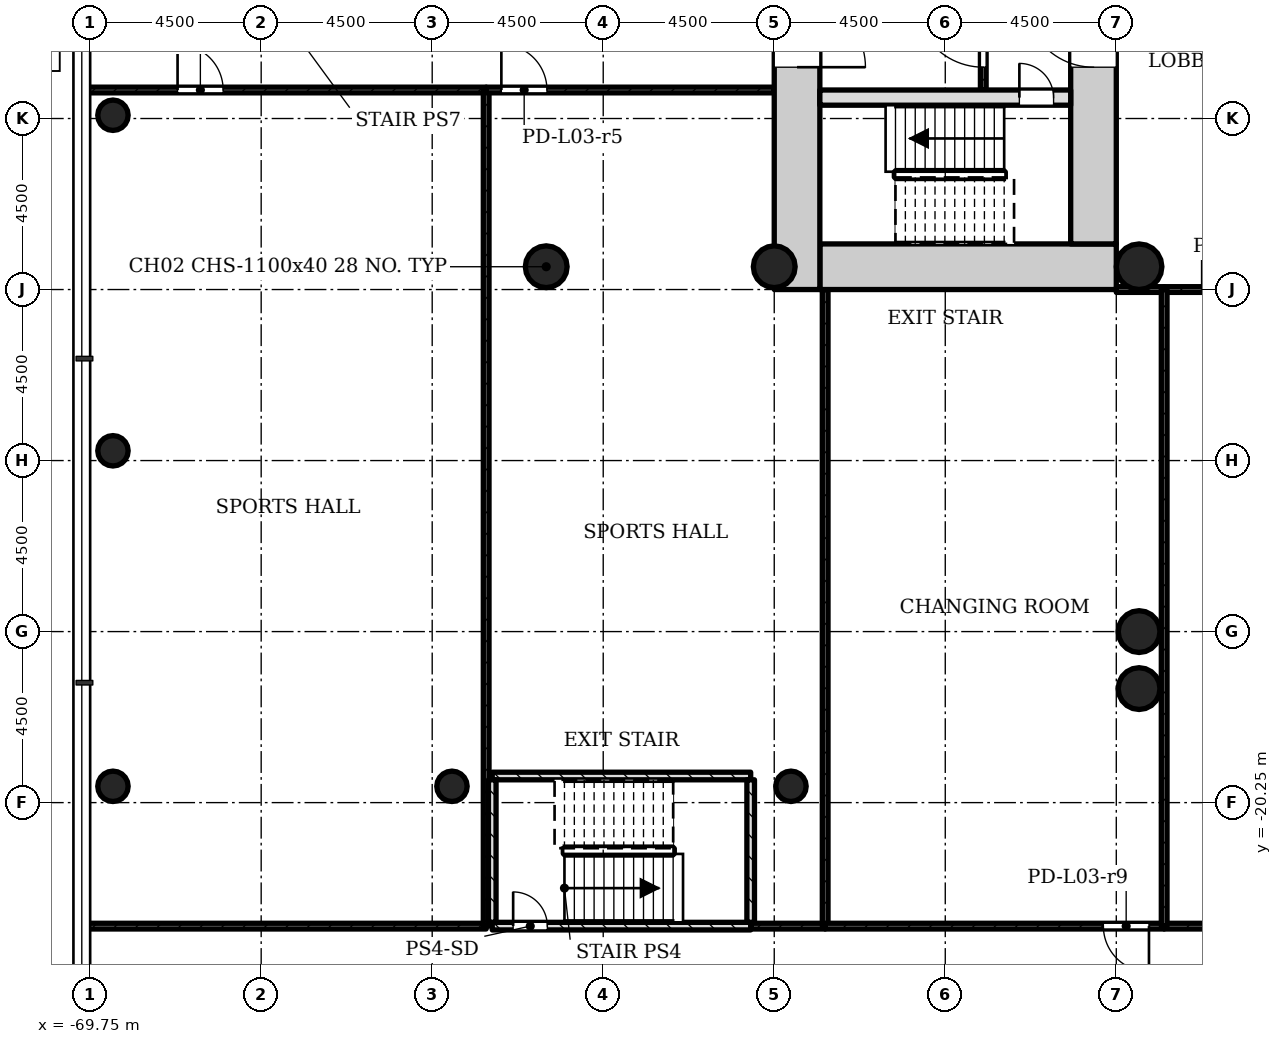
"""IFC4 building model, lengths in metres.
Left out: names, types, materials, properties, quantities, classifications, styles, units other than length and angle.
Written with IfcOpenShell. Run it as: python <this file> out.ifc"""

import sys

from ifc_helpers import new_model, si_unit, direction, frame, frame_2d, origin, origin_2d, place, context, subcontext, project, spatial, rectangle, hollow_circle, extrude, element, fill, save


model = new_model("IFC4")
c1 = context("Model", 3, precision=1e-05, world=origin(), true_north=direction((0.0, 1.0)))
c2 = subcontext(c1, "Body", "Model", "MODEL_VIEW")
j1 = project(units=[si_unit("LENGTHUNIT", "METRE"), si_unit("PLANEANGLEUNIT", "RADIAN")], contexts=[c1])
p1 = place(None, origin())
s1 = spatial("IfcSite", under=j1, at=p1, CompositionType="ELEMENT")
p2 = place(p1, origin())
s2 = spatial("IfcBuilding", under=s1, at=p2, CompositionType="ELEMENT")
p3 = place(p2, frame((0.0, 0.0, 15.5)))
s3 = spatial("IfcBuildingStorey", under=s2, at=p3, CompositionType="ELEMENT", Elevation=15.5)
p4 = place(p3, frame((-50.55, -6.15, 0.0), z_axis=(0.0, 0.0, 1.0), x_axis=(1.0, 0.0, 0.0)))
e1 = element("IfcWall", 1, at=p4, inside=s3, PredefinedType="SHEAR", context=c2, shape_type="SweptSolid", body=[
    extrude(rectangle(XDim=7.8, YDim=1.2, at=frame_2d((3.9, 0.0))), origin(), (0.0, 0.0, 1.0), 4.5),
])
p5 = place(p3, frame((-43.35, -5.55, 0.0), z_axis=(0.0, 0.0, 1.0), x_axis=(0.0, 1.0, 0.0)))
e2 = element("IfcWall", 2, at=p5, inside=s3, PredefinedType="SHEAR", context=c2, shape_type="SweptSolid", body=[
    extrude(rectangle(XDim=12.3, YDim=1.2, at=frame_2d((6.15, 0.0))), origin(), (0.0, 0.0, 1.0), 4.5),
])
p6 = place(p5, frame((4.65, 0.0, 0.0)))
e3 = element("IfcOpeningElement", 3, at=p6, cuts=e2, PredefinedType="OPENING", context=c2, shape_type="SweptSolid", body=[
    extrude(rectangle(XDim=1.8, YDim=2.1, at=frame_2d((0.9, 1.05))), frame((0.0, 0.61, 0.0), z_axis=(0.0, -1.0, 0.0), x_axis=(1.0, 0.0, 0.0)), (0.0, 0.0, 1.0), 1.22),
])
p7 = place(p3, frame((-51.15, 5.55, 0.0), z_axis=(0.0, 0.0, 1.0), x_axis=(0.0, -1.0, 0.0)))
e4 = element("IfcWall", 4, at=p7, inside=s3, PredefinedType="SHEAR", context=c2, shape_type="SweptSolid", body=[
    extrude(rectangle(XDim=12.3, YDim=1.2, at=frame_2d((6.15, 0.0))), origin(), (0.0, 0.0, 1.0), 4.5),
])
p8 = place(p7, frame((4.65, 0.0, 0.0)))
e5 = element("IfcOpeningElement", 5, at=p8, cuts=e4, PredefinedType="OPENING", context=c2, shape_type="SweptSolid", body=[
    extrude(rectangle(XDim=1.8, YDim=2.1, at=frame_2d((0.9, 1.05))), frame((0.0, 0.61, 0.0), z_axis=(0.0, -1.0, 0.0), x_axis=(1.0, 0.0, 0.0)), (0.0, 0.0, 1.0), 1.22),
])
p9 = place(p3, frame((-50.55, -1.7, 0.0), z_axis=(0.0, 0.0, 1.0), x_axis=(1.0, 0.0, 0.0)))
e6 = element("IfcWall", 6, at=p9, inside=s3, PredefinedType="SHEAR", context=c2, shape_type="SweptSolid", body=[
    extrude(rectangle(XDim=6.6, YDim=0.4, at=frame_2d((3.3, 0.0))), origin(), (0.0, 0.0, 1.0), 4.5),
])
p10 = place(p9, frame((5.25, 0.0, 0.0)))
e7 = element("IfcOpeningElement", 7, at=p10, cuts=e6, PredefinedType="OPENING", context=c2, shape_type="SweptSolid", body=[
    extrude(rectangle(XDim=0.9, YDim=2.1, at=frame_2d((0.45, 1.05))), frame((0.0, 0.21, 0.0), z_axis=(0.0, -1.0, 0.0), x_axis=(1.0, 0.0, 0.0)), (0.0, 0.0, 1.0), 0.42),
])
for number, where, z_axis, x_axis in (
    (8, (-51.75, -6.15, 0.0), (0.0, 0.0, 1.0), (1.0, 0.0, 0.0)),
    (9, (-57.75, -6.15, 0.0), (0.0, 0.0, 1.0), (1.0, 0.0, 0.0)),
    (10, (-42.15, -15.75, 0.0), (0.0, 0.0, 1.0), (1.0, 0.0, 0.0)),
    (11, (-42.15, -17.25, 0.0), (0.0, 0.0, 1.0), (1.0, 0.0, 0.0)),
):
    element("IfcColumn", number, at=place(p3, frame(where, z_axis=z_axis, x_axis=x_axis)), inside=s3, PredefinedType="COLUMN", context=c2, shape_type="SweptSolid", body=[
        extrude(hollow_circle(Radius=0.55, WallThickness=0.04, at=origin_2d()), origin(), (0.0, 0.0, 1.0), 4.5),
    ])
p11 = place(p3, frame((-42.15, -6.15, 0.0), z_axis=(0.0, 0.0, 1.0), x_axis=(1.0, 0.0, 0.0)))
e12 = element("IfcColumn", 12, at=p11, inside=s3, PredefinedType="COLUMN", context=c2, shape_type="SweptSolid", body=[
    extrude(hollow_circle(Radius=0.6, WallThickness=0.045, at=origin_2d()), origin(), (0.0, 0.0, 1.0), 4.5),
])
for number, where, z_axis, x_axis in (
    (13, (-69.15, -19.821, 0.0), (0.0, 0.0, 1.0), (1.0, 0.0, 0.0)),
    (14, (-60.23, -19.821, 0.0), (0.0, 0.0, 1.0), (1.0, 0.0, 0.0)),
    (15, (-51.31, -19.821, 0.0), (0.0, 0.0, 1.0), (1.0, 0.0, 0.0)),
    (16, (-69.15, -10.993, 0.0), (0.0, 0.0, 1.0), (1.0, 0.0, 0.0)),
    (17, (-69.15, -2.164, 0.0), (0.0, 0.0, 1.0), (1.0, 0.0, 0.0)),
):
    element("IfcColumn", number, at=place(p3, frame(where, z_axis=z_axis, x_axis=x_axis)), inside=s3, PredefinedType="COLUMN", context=c2, shape_type="SweptSolid", body=[
        extrude(hollow_circle(Radius=0.4, WallThickness=0.028, at=origin_2d()), origin(), (0.0, 0.0, 1.0), 4.5),
    ])
p12 = place(p3, frame((-46.25, 1.5, 0.0), z_axis=(0.0, 0.0, 1.0), x_axis=(0.0, -1.0, 0.0)))
e18 = element("IfcWall", 18, at=p12, inside=s3, PredefinedType="PARTITIONING", context=c2, shape_type="SweptSolid", body=[
    extrude(rectangle(XDim=3.0, YDim=0.15, at=frame_2d((1.5, 0.0))), origin(), (0.0, 0.0, 1.0), 4.08),
])
p13 = place(p12, frame((0.6, 0.0, 0.0)))
e19 = element("IfcOpeningElement", 19, at=p13, cuts=e18, PredefinedType="OPENING", context=c2, shape_type="SweptSolid", body=[
    extrude(rectangle(XDim=1.8, YDim=2.1, at=frame_2d((0.9, 1.05))), frame((0.0, 0.085, 0.0), z_axis=(0.0, -1.0, 0.0), x_axis=(1.0, 0.0, 0.0)), (0.0, 0.0, 1.0), 0.17),
])
p14 = place(p3, frame((-69.85, -1.5, 0.0), z_axis=(0.0, 0.0, 1.0), x_axis=(1.0, 0.0, 0.0)))
e20 = element("IfcWall", 20, at=p14, inside=s3, PredefinedType="PARTITIONING", context=c2, shape_type="SweptSolid", body=[
    extrude(rectangle(XDim=10.52, YDim=0.15, at=frame_2d((5.26, 0.0))), origin(), (0.0, 0.0, 1.0), 4.08),
])
p15 = place(p14, frame((2.4, 0.0, 0.0)))
e21 = element("IfcOpeningElement", 21, at=p15, cuts=e20, PredefinedType="OPENING", context=c2, shape_type="SweptSolid", body=[
    extrude(rectangle(XDim=1.2, YDim=2.1, at=frame_2d((0.6, 1.05))), frame((0.0, 0.085, 0.0), z_axis=(0.0, -1.0, 0.0), x_axis=(1.0, 0.0, 0.0)), (0.0, 0.0, 1.0), 0.17),
])
p16 = place(p3, frame((-59.33, -23.5, 0.0), z_axis=(0.0, 0.0, 1.0), x_axis=(-1.0, 0.0, 0.0)))
e22 = element("IfcWall", 22, at=p16, inside=s3, PredefinedType="PARTITIONING", context=c2, shape_type="SweptSolid", body=[
    extrude(rectangle(XDim=10.52, YDim=0.15, at=frame_2d((5.26, 0.0))), origin(), (0.0, 0.0, 1.0), 4.08),
])
p17 = place(p3, frame((-59.33, -1.5, 0.0), z_axis=(0.0, 0.0, 1.0), x_axis=(0.0, -1.0, 0.0)))
e23 = element("IfcWall", 23, at=p17, inside=s3, PredefinedType="PARTITIONING", context=c2, shape_type="SweptSolid", body=[
    extrude(rectangle(XDim=22.0, YDim=0.15, at=frame_2d((11.0, 0.0))), origin(), (0.0, 0.0, 1.0), 4.08),
])
p18 = place(p3, frame((-59.33, -1.5, 0.0), z_axis=(0.0, 0.0, 1.0), x_axis=(1.0, 0.0, 0.0)))
e24 = element("IfcWall", 24, at=p18, inside=s3, PredefinedType="PARTITIONING", context=c2, shape_type="SweptSolid", body=[
    extrude(rectangle(XDim=7.58, YDim=0.15, at=frame_2d((3.79, 0.0))), origin(), (0.0, 0.0, 1.0), 4.08),
])
p19 = place(p18, frame((0.4, 0.0, 0.0)))
e25 = element("IfcOpeningElement", 25, at=p19, cuts=e24, PredefinedType="OPENING", context=c2, shape_type="SweptSolid", body=[
    extrude(rectangle(XDim=1.2, YDim=2.1, at=frame_2d((0.6, 1.05))), frame((0.0, 0.085, 0.0), z_axis=(0.0, -1.0, 0.0), x_axis=(1.0, 0.0, 0.0)), (0.0, 0.0, 1.0), 0.17),
])
p20 = place(p3, frame((-50.41, -23.5, 0.0), z_axis=(0.0, 0.0, 1.0), x_axis=(-1.0, 0.0, 0.0)))
e26 = element("IfcWall", 26, at=p20, inside=s3, PredefinedType="PARTITIONING", context=c2, shape_type="SweptSolid", body=[
    extrude(rectangle(XDim=1.96, YDim=0.15, at=frame_2d((0.98, 0.0))), origin(), (0.0, 0.0, 1.0), 4.08),
])
p21 = place(p3, frame((-50.41, -6.75, 0.0), z_axis=(0.0, 0.0, 1.0), x_axis=(0.0, -1.0, 0.0)))
e27 = element("IfcWall", 27, at=p21, inside=s3, PredefinedType="PARTITIONING", context=c2, shape_type="SweptSolid", body=[
    extrude(rectangle(XDim=16.75, YDim=0.15, at=frame_2d((8.375, 0.0))), origin(), (0.0, 0.0, 1.0), 4.08),
])
p22 = place(p3, frame((-42.75, -6.75, 0.0), z_axis=(0.0, 0.0, 1.0), x_axis=(1.0, 0.0, 0.0)))
e28 = element("IfcWall", 28, at=p22, inside=s3, PredefinedType="PARTITIONING", context=c2, shape_type="SweptSolid", body=[
    extrude(rectangle(XDim=1.26, YDim=0.15, at=frame_2d((0.63, 0.0))), origin(), (0.0, 0.0, 1.0), 4.08),
])
p23 = place(p3, frame((-41.49, -23.5, 0.0), z_axis=(0.0, 0.0, 1.0), x_axis=(-1.0, 0.0, 0.0)))
e29 = element("IfcWall", 29, at=p23, inside=s3, PredefinedType="PARTITIONING", context=c2, shape_type="SweptSolid", body=[
    extrude(rectangle(XDim=8.92, YDim=0.15, at=frame_2d((4.46, 0.0))), origin(), (0.0, 0.0, 1.0), 4.08),
])
p24 = place(p23, frame((0.4, 0.0, 0.0)))
e30 = element("IfcOpeningElement", 30, at=p24, cuts=e29, PredefinedType="OPENING", context=c2, shape_type="SweptSolid", body=[
    extrude(rectangle(XDim=1.2, YDim=2.1, at=frame_2d((0.6, 1.05))), frame((0.0, 0.085, 0.0), z_axis=(0.0, -1.0, 0.0), x_axis=(1.0, 0.0, 0.0)), (0.0, 0.0, 1.0), 0.17),
])
p25 = place(p3, frame((-41.49, -6.75, 0.0), z_axis=(0.0, 0.0, 1.0), x_axis=(1.0, 0.0, 0.0)))
e31 = element("IfcWall", 31, at=p25, inside=s3, PredefinedType="PARTITIONING", context=c2, shape_type="SweptSolid", body=[
    extrude(rectangle(XDim=8.92, YDim=0.15, at=frame_2d((4.46, 0.0))), origin(), (0.0, 0.0, 1.0), 4.08),
])
p26 = place(p25, frame((1.0, 0.0, 0.0)))
e32 = element("IfcOpeningElement", 32, at=p26, cuts=e31, PredefinedType="OPENING", context=c2, shape_type="SweptSolid", body=[
    extrude(rectangle(XDim=1.2, YDim=2.1, at=frame_2d((0.6, 1.05))), frame((0.0, 0.085, 0.0), z_axis=(0.0, -1.0, 0.0), x_axis=(1.0, 0.0, 0.0)), (0.0, 0.0, 1.0), 0.17),
])
p27 = place(p3, frame((-32.57, -23.5, 0.0), z_axis=(0.0, 0.0, 1.0), x_axis=(-1.0, 0.0, 0.0)))
e33 = element("IfcWall", 33, at=p27, inside=s3, PredefinedType="PARTITIONING", context=c2, shape_type="SweptSolid", body=[
    extrude(rectangle(XDim=8.92, YDim=0.15, at=frame_2d((4.46, 0.0))), origin(), (0.0, 0.0, 1.0), 4.08),
])
p28 = place(p3, frame((-41.49, -23.5, 0.0), z_axis=(0.0, 0.0, 1.0), x_axis=(0.0, 1.0, 0.0)))
e34 = element("IfcWall", 34, at=p28, inside=s3, PredefinedType="PARTITIONING", context=c2, shape_type="SweptSolid", body=[
    extrude(rectangle(XDim=16.75, YDim=0.15, at=frame_2d((8.375, 0.0))), origin(), (0.0, 0.0, 1.0), 4.08),
])
p29 = place(p3, frame((-59.17, -23.5, 0.0), z_axis=(0.0, 0.0, 1.0), x_axis=(1.0, 0.0, 0.0)))
e35 = element("IfcWall", 35, at=p29, inside=s3, PredefinedType="SHEAR", context=c2, shape_type="SweptSolid", body=[
    extrude(rectangle(XDim=6.8, YDim=0.2, at=frame_2d((3.4, 0.0))), origin(), (0.0, 0.0, 1.0), 4.08),
])
p30 = place(p29, frame((0.55, 0.0, 0.0)))
e36 = element("IfcOpeningElement", 36, at=p30, cuts=e35, PredefinedType="OPENING", context=c2, shape_type="SweptSolid", body=[
    extrude(rectangle(XDim=0.9, YDim=2.1, at=frame_2d((0.45, 1.05))), frame((0.0, 0.11, 0.0), z_axis=(0.0, -1.0, 0.0), x_axis=(1.0, 0.0, 0.0)), (0.0, 0.0, 1.0), 0.22),
])
p31 = place(p3, frame((-59.17, -19.55, 0.0), z_axis=(0.0, 0.0, 1.0), x_axis=(1.0, 0.0, 0.0)))
e37 = element("IfcWall", 37, at=p31, inside=s3, PredefinedType="SHEAR", context=c2, shape_type="SweptSolid", body=[
    extrude(rectangle(XDim=6.8, YDim=0.2, at=frame_2d((3.4, 0.0))), origin(), (0.0, 0.0, 1.0), 4.08),
])
for number, where, z_axis, x_axis in (
    (38, (-59.17, -23.4, 0.0), (0.0, 0.0, 1.0), (0.0, 1.0, 0.0)),
    (39, (-52.37, -23.4, 0.0), (0.0, 0.0, 1.0), (0.0, 1.0, 0.0)),
):
    element("IfcWall", number, at=place(p3, frame(where, z_axis=z_axis, x_axis=x_axis)), inside=s3, PredefinedType="SHEAR", context=c2, shape_type="SweptSolid", body=[
        extrude(rectangle(XDim=3.75, YDim=0.2, at=frame_2d((1.875, 0.0))), origin(), (0.0, 0.0, 1.0), 4.08),
    ])
p32 = place(p13, origin())
e40 = element("IfcDoor", 40, at=p32, inside=s3, OperationType="SINGLE_SWING_LEFT", PredefinedType="DOOR", context=c2, shape_type="SweptSolid", body=[
    extrude(rectangle(XDim=1.8, YDim=2.1, at=frame_2d((0.9, 1.05))), frame((0.0, 0.025, 0.0), z_axis=(0.0, -1.0, 0.0), x_axis=(1.0, 0.0, 0.0)), (0.0, 0.0, 1.0), 0.05),
])
fill(e19, e40)
p33 = place(p15, origin())
e41 = element("IfcDoor", 41, at=p33, inside=s3, OperationType="SINGLE_SWING_RIGHT", PredefinedType="DOOR", context=c2, shape_type="SweptSolid", body=[
    extrude(rectangle(XDim=1.2, YDim=2.1, at=frame_2d((0.6, 1.05))), frame((0.0, 0.025, 0.0), z_axis=(0.0, -1.0, 0.0), x_axis=(1.0, 0.0, 0.0)), (0.0, 0.0, 1.0), 0.05),
])
fill(e21, e41)
p34 = place(p19, origin())
e42 = element("IfcDoor", 42, at=p34, inside=s3, OperationType="SINGLE_SWING_RIGHT", PredefinedType="DOOR", context=c2, shape_type="SweptSolid", body=[
    extrude(rectangle(XDim=1.2, YDim=2.1, at=frame_2d((0.6, 1.05))), frame((0.0, 0.025, 0.0), z_axis=(0.0, -1.0, 0.0), x_axis=(1.0, 0.0, 0.0)), (0.0, 0.0, 1.0), 0.05),
])
fill(e25, e42)
p35 = place(p24, origin())
e43 = element("IfcDoor", 43, at=p35, inside=s3, OperationType="SINGLE_SWING_RIGHT", PredefinedType="DOOR", context=c2, shape_type="SweptSolid", body=[
    extrude(rectangle(XDim=1.2, YDim=2.1, at=frame_2d((0.6, 1.05))), frame((0.0, 0.025, 0.0), z_axis=(0.0, -1.0, 0.0), x_axis=(1.0, 0.0, 0.0)), (0.0, 0.0, 1.0), 0.05),
])
fill(e30, e43)
p36 = place(p30, origin())
e44 = element("IfcDoor", 44, at=p36, inside=s3, OperationType="SINGLE_SWING_RIGHT", PredefinedType="DOOR", context=c2, shape_type="SweptSolid", body=[
    extrude(rectangle(XDim=0.9, YDim=2.1, at=frame_2d((0.45, 1.05))), frame((0.0, 0.025, 0.0), z_axis=(0.0, -1.0, 0.0), x_axis=(1.0, 0.0, 0.0)), (0.0, 0.0, 1.0), 0.05),
])
fill(e36, e44)
p37 = place(p10, origin())
e45 = element("IfcDoor", 45, at=p37, inside=s3, OperationType="SINGLE_SWING_RIGHT", PredefinedType="DOOR", context=c2, shape_type="SweptSolid", body=[
    extrude(rectangle(XDim=0.9, YDim=2.1, at=frame_2d((0.45, 1.05))), frame((0.0, 0.025, 0.0), z_axis=(0.0, -1.0, 0.0), x_axis=(1.0, 0.0, 0.0)), (0.0, 0.0, 1.0), 0.05),
])
fill(e7, e45)
p38 = place(p6, origin())
e46 = element("IfcDoor", 46, at=p38, inside=s3, OperationType="SINGLE_SWING_LEFT", PredefinedType="DOOR", context=c2, shape_type="SweptSolid", body=[
    extrude(rectangle(XDim=1.8, YDim=2.1, at=frame_2d((0.9, 1.05))), frame((0.0, 0.025, 0.0), z_axis=(0.0, -1.0, 0.0), x_axis=(1.0, 0.0, 0.0)), (0.0, 0.0, 1.0), 0.05),
])
fill(e3, e46)
p39 = place(p8, origin())
e47 = element("IfcDoor", 47, at=p39, inside=s3, OperationType="SINGLE_SWING_LEFT", PredefinedType="DOOR", context=c2, shape_type="SweptSolid", body=[
    extrude(rectangle(XDim=1.8, YDim=2.1, at=frame_2d((0.9, 1.05))), frame((0.0, 0.025, 0.0), z_axis=(0.0, -1.0, 0.0), x_axis=(1.0, 0.0, 0.0)), (0.0, 0.0, 1.0), 0.05),
])
fill(e5, e47)
save(model, sys.argv[1])
